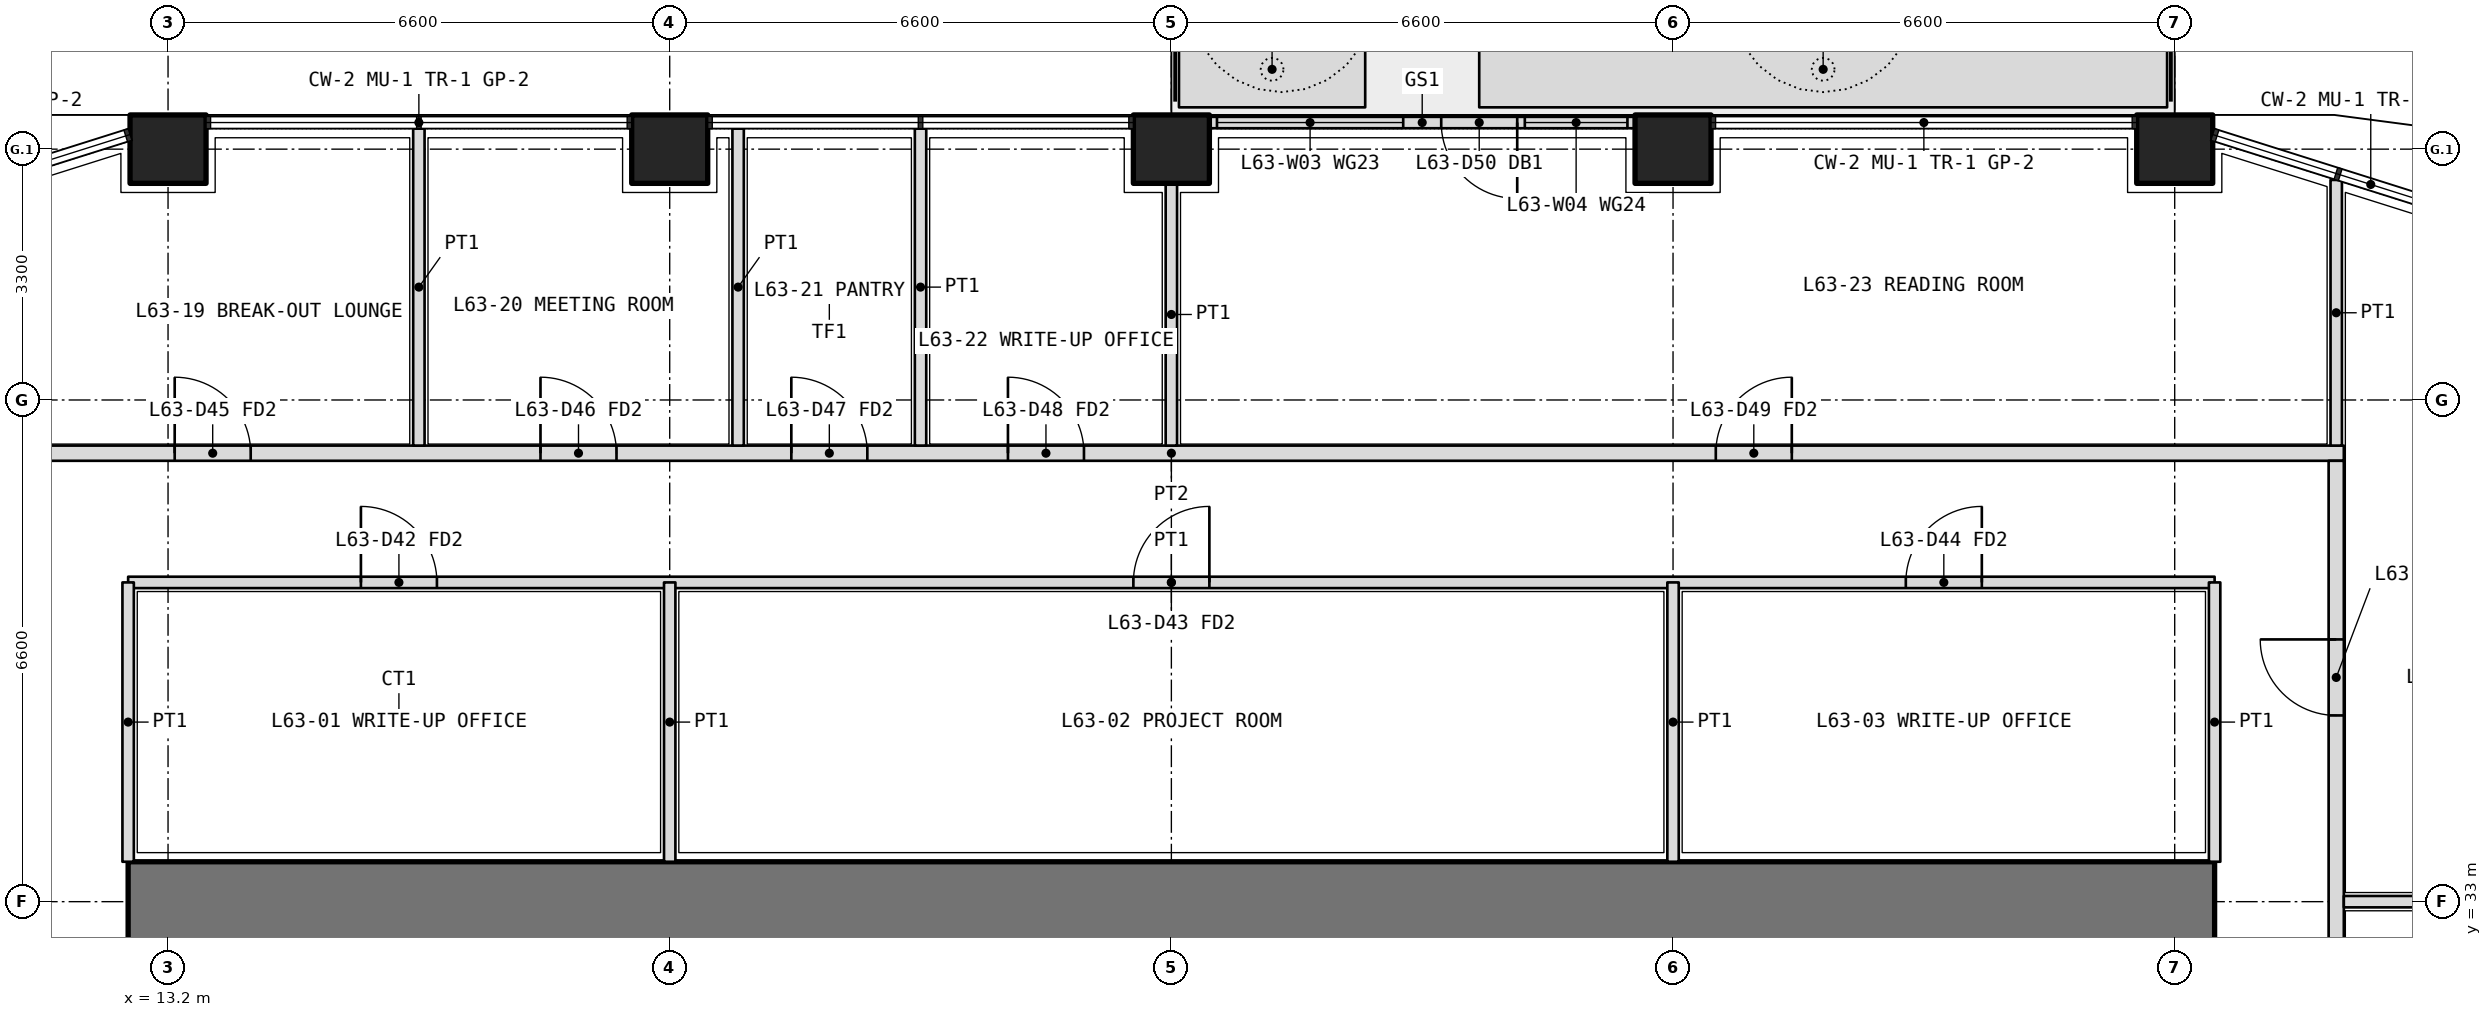
"""IFC4 building model, lengths in metres.
Left out: names, types, materials, properties, quantities, classifications, styles, units other than length and angle.
Written with IfcOpenShell. Run it as: python <this file> out.ifc"""

import sys

from ifc_helpers import new_model, si_unit, direction, frame, frame_2d, origin, origin_2d, place, context, subcontext, project, spatial, polyline, rectangle, outline, extrude, element, fill, save


model = new_model("IFC4")
c1 = context("Model", 3, precision=1e-05, world=origin(), true_north=direction((0.0, 1.0)))
c2 = subcontext(c1, "Body", "Model", "MODEL_VIEW")
j1 = project(units=[si_unit("LENGTHUNIT", "METRE"), si_unit("PLANEANGLEUNIT", "RADIAN")], contexts=[c1])
p1 = place(None, origin())
s1 = spatial("IfcSite", under=j1, at=p1, CompositionType="ELEMENT")
p2 = place(p1, origin())
s2 = spatial("IfcBuilding", under=s1, at=p2, CompositionType="ELEMENT")
p3 = place(p2, frame((0.0, 0.0, 275.4)))
s3 = spatial("IfcBuildingStorey", under=s2, at=p3, CompositionType="ELEMENT", Elevation=275.4)
for number, where, z_axis, x_axis in (
    (1, (13.2, 42.9, 0.0), (0.0, 0.0, 1.0), (1.0, 0.0, 0.0)),
    (2, (19.8, 42.9, 0.0), (0.0, 0.0, 1.0), (1.0, 0.0, 0.0)),
    (3, (26.4, 42.9, 0.0), (0.0, 0.0, 1.0), (1.0, 0.0, 0.0)),
    (4, (33.0, 42.9, 0.0), (0.0, 0.0, 1.0), (1.0, 0.0, 0.0)),
    (5, (39.6, 42.9, 0.0), (0.0, 0.0, 1.0), (1.0, 0.0, 0.0)),
):
    element("IfcColumn", number, at=place(p3, frame(where, z_axis=z_axis, x_axis=x_axis)), inside=s3, PredefinedType="COLUMN", context=c2, shape_type="SweptSolid", body=[
        extrude(rectangle(XDim=1.0, YDim=0.9, at=origin_2d()), origin(), (0.0, 0.0, 1.0), 4.2),
    ])
p4 = place(p3, origin())
e6 = element("IfcWall", 6, at=p4, inside=s3, PredefinedType="USERDEFINED", context=c2, shape_type="SweptSolid", body=[
    extrude(outline(polyline([(26.5, 43.45), (28.95, 43.45), (28.95, 44.45), (26.5, 44.45), (26.5, 43.45)]), holes=[polyline([(26.65, 43.6), (28.8, 43.6), (28.8, 44.3), (26.65, 44.3), (26.65, 43.6)])]), origin(), (0.0, 0.0, 1.0), 1.05),
])
p5 = place(p3, origin())
e7 = element("IfcWall", 7, at=p5, inside=s3, PredefinedType="USERDEFINED", context=c2, shape_type="SweptSolid", body=[
    extrude(outline(polyline([(30.45, 43.45), (39.5, 43.45), (39.5, 44.45), (30.45, 44.45), (30.45, 43.45)]), holes=[polyline([(30.6, 43.6), (39.35, 43.6), (39.35, 44.3), (30.6, 44.3), (30.6, 43.6)])]), origin(), (0.0, 0.0, 1.0), 1.05),
])
p6 = place(p3, frame((32.5, 43.25, 0.0), z_axis=(0.0, 0.0, 1.0), x_axis=(-1.0, 0.0, 0.0)))
e8 = element("IfcWall", 8, at=p6, inside=s3, PredefinedType="SOLIDWALL", context=c2, shape_type="SweptSolid", body=[
    extrude(rectangle(XDim=5.6, YDim=0.15, at=frame_2d((2.8, 0.0))), origin(), (0.0, 0.0, 1.0), 2.7),
])
p7 = place(p6, frame((1.55, 0.0, 0.0)))
e9 = element("IfcOpeningElement", 9, at=p7, cuts=e8, PredefinedType="OPENING", context=c2, shape_type="SweptSolid", body=[
    extrude(rectangle(XDim=1.0, YDim=2.4, at=frame_2d((0.5, 1.2))), frame((0.0, 0.085, 0.0), z_axis=(0.0, -1.0, 0.0), x_axis=(1.0, 0.0, 0.0)), (0.0, 0.0, 1.0), 0.17),
])
p8 = place(p6, frame((0.1, 0.0, 0.1)))
e10 = element("IfcOpeningElement", 10, at=p8, cuts=e8, PredefinedType="OPENING", context=c2, shape_type="SweptSolid", body=[
    extrude(rectangle(XDim=1.35, YDim=2.3, at=frame_2d((0.675, 1.15))), frame((0.0, 0.085, 0.0), z_axis=(0.0, -1.0, 0.0), x_axis=(1.0, 0.0, 0.0)), (0.0, 0.0, 1.0), 0.17),
])
p9 = place(p6, frame((3.05, 0.0, 0.1)))
e11 = element("IfcOpeningElement", 11, at=p9, cuts=e8, PredefinedType="OPENING", context=c2, shape_type="SweptSolid", body=[
    extrude(rectangle(XDim=2.45, YDim=2.3, at=frame_2d((1.225, 1.15))), frame((0.0, 0.085, 0.0), z_axis=(0.0, -1.0, 0.0), x_axis=(1.0, 0.0, 0.0)), (0.0, 0.0, 1.0), 0.17),
])
p10 = place(p3, frame((40.125, 33.0, 0.0), z_axis=(0.0, 0.0, 1.0), x_axis=(-1.0, 0.0, 0.0)))
e12 = element("IfcWall", 12, at=p10, inside=s3, PredefinedType="SHEAR", context=c2, shape_type="SweptSolid", body=[
    extrude(rectangle(XDim=27.45, YDim=1.05, at=frame_2d((13.725, 0.0))), origin(), (0.0, 0.0, 1.0), 4.2),
])
p11 = place(p3, frame((12.675, 37.2, 0.0), z_axis=(0.0, 0.0, 1.0), x_axis=(1.0, 0.0, 0.0)))
e13 = element("IfcWall", 13, at=p11, inside=s3, PredefinedType="PARTITIONING", context=c2, shape_type="SweptSolid", body=[
    extrude(rectangle(XDim=27.45, YDim=0.15, at=frame_2d((13.725, 0.0))), origin(), (0.0, 0.0, 1.0), 3.0),
])
p12 = place(p11, frame((3.062, 0.0, 0.0)))
e14 = element("IfcOpeningElement", 14, at=p12, cuts=e13, PredefinedType="OPENING", context=c2, shape_type="SweptSolid", body=[
    extrude(rectangle(XDim=1.0, YDim=2.1, at=frame_2d((0.5, 1.05))), frame((0.0, 0.085, 0.0), z_axis=(0.0, -1.0, 0.0), x_axis=(1.0, 0.0, 0.0)), (0.0, 0.0, 1.0), 0.17),
])
p13 = place(p11, frame((13.225, 0.0, 0.0)))
e15 = element("IfcOpeningElement", 15, at=p13, cuts=e13, PredefinedType="OPENING", context=c2, shape_type="SweptSolid", body=[
    extrude(rectangle(XDim=1.0, YDim=2.1, at=frame_2d((0.5, 1.05))), frame((0.0, 0.085, 0.0), z_axis=(0.0, -1.0, 0.0), x_axis=(1.0, 0.0, 0.0)), (0.0, 0.0, 1.0), 0.17),
])
p14 = place(p11, frame((23.387, 0.0, 0.0)))
e16 = element("IfcOpeningElement", 16, at=p14, cuts=e13, PredefinedType="OPENING", context=c2, shape_type="SweptSolid", body=[
    extrude(rectangle(XDim=1.0, YDim=2.1, at=frame_2d((0.5, 1.05))), frame((0.0, 0.085, 0.0), z_axis=(0.0, -1.0, 0.0), x_axis=(1.0, 0.0, 0.0)), (0.0, 0.0, 1.0), 0.17),
])
for number, where, z_axis, x_axis in (
    (17, (12.675, 33.525, 0.0), (0.0, 0.0, 1.0), (0.0, 1.0, 0.0)),
    (18, (40.125, 33.525, 0.0), (0.0, 0.0, 1.0), (0.0, 1.0, 0.0)),
    (19, (19.8, 33.525, 0.0), (0.0, 0.0, 1.0), (0.0, 1.0, 0.0)),
    (20, (33.0, 33.525, 0.0), (0.0, 0.0, 1.0), (0.0, 1.0, 0.0)),
):
    element("IfcWall", number, at=place(p3, frame(where, z_axis=z_axis, x_axis=x_axis)), inside=s3, PredefinedType="PARTITIONING", context=c2, shape_type="SweptSolid", body=[
        extrude(rectangle(XDim=3.675, YDim=0.15, at=frame_2d((1.837, 0.0))), origin(), (0.0, 0.0, 1.0), 3.0),
    ])
p15 = place(p3, frame((10.975, 38.9, 0.0), z_axis=(0.0, 0.0, 1.0), x_axis=(1.0, 0.0, 0.0)))
e21 = element("IfcWall", 21, at=p15, inside=s3, PredefinedType="PARTITIONING", context=c2, shape_type="SweptSolid", body=[
    extrude(rectangle(XDim=30.85, YDim=0.2, at=frame_2d((15.425, 0.0))), origin(), (0.0, 0.0, 1.0), 3.0),
])
p16 = place(p15, frame((2.312, 0.0, 0.0)))
e22 = element("IfcOpeningElement", 22, at=p16, cuts=e21, PredefinedType="OPENING", context=c2, shape_type="SweptSolid", body=[
    extrude(rectangle(XDim=1.0, YDim=2.1, at=frame_2d((0.5, 1.05))), frame((0.0, 0.11, 0.0), z_axis=(0.0, -1.0, 0.0), x_axis=(1.0, 0.0, 0.0)), (0.0, 0.0, 1.0), 0.22),
])
p17 = place(p15, frame((7.125, 0.0, 0.0)))
e23 = element("IfcOpeningElement", 23, at=p17, cuts=e21, PredefinedType="OPENING", context=c2, shape_type="SweptSolid", body=[
    extrude(rectangle(XDim=1.0, YDim=2.1, at=frame_2d((0.5, 1.05))), frame((0.0, 0.11, 0.0), z_axis=(0.0, -1.0, 0.0), x_axis=(1.0, 0.0, 0.0)), (0.0, 0.0, 1.0), 0.22),
])
p18 = place(p15, frame((10.425, 0.0, 0.0)))
e24 = element("IfcOpeningElement", 24, at=p18, cuts=e21, PredefinedType="OPENING", context=c2, shape_type="SweptSolid", body=[
    extrude(rectangle(XDim=1.0, YDim=2.1, at=frame_2d((0.5, 1.05))), frame((0.0, 0.11, 0.0), z_axis=(0.0, -1.0, 0.0), x_axis=(1.0, 0.0, 0.0)), (0.0, 0.0, 1.0), 0.22),
])
p19 = place(p15, frame((13.275, 0.0, 0.0)))
e25 = element("IfcOpeningElement", 25, at=p19, cuts=e21, PredefinedType="OPENING", context=c2, shape_type="SweptSolid", body=[
    extrude(rectangle(XDim=1.0, YDim=2.1, at=frame_2d((0.5, 1.05))), frame((0.0, 0.11, 0.0), z_axis=(0.0, -1.0, 0.0), x_axis=(1.0, 0.0, 0.0)), (0.0, 0.0, 1.0), 0.22),
])
p20 = place(p15, frame((22.587, 0.0, 0.0)))
e26 = element("IfcOpeningElement", 26, at=p20, cuts=e21, PredefinedType="OPENING", context=c2, shape_type="SweptSolid", body=[
    extrude(rectangle(XDim=1.0, YDim=2.1, at=frame_2d((0.5, 1.05))), frame((0.0, 0.11, 0.0), z_axis=(0.0, -1.0, 0.0), x_axis=(1.0, 0.0, 0.0)), (0.0, 0.0, 1.0), 0.22),
])
p21 = place(p3, frame((41.725, 7.4, 0.0), z_axis=(0.0, 0.0, 1.0), x_axis=(0.0, 1.0, 0.0)))
e27 = element("IfcWall", 27, at=p21, inside=s3, PredefinedType="PARTITIONING", context=c2, shape_type="SweptSolid", body=[
    extrude(rectangle(XDim=31.4, YDim=0.2, at=frame_2d((15.7, 0.0))), origin(), (0.0, 0.0, 1.0), 3.0),
])
p22 = place(p21, frame((3.9, 0.0, 0.0)))
e28 = element("IfcOpeningElement", 28, at=p22, cuts=e27, PredefinedType="OPENING", context=c2, shape_type="SweptSolid", body=[
    extrude(rectangle(XDim=1.2, YDim=2.1, at=frame_2d((0.6, 1.05))), frame((0.0, 0.11, 0.0), z_axis=(0.0, -1.0, 0.0), x_axis=(1.0, 0.0, 0.0)), (0.0, 0.0, 1.0), 0.22),
])
p23 = place(p21, frame((10.25, 0.0, 0.0)))
e29 = element("IfcOpeningElement", 29, at=p23, cuts=e27, PredefinedType="OPENING", context=c2, shape_type="SweptSolid", body=[
    extrude(rectangle(XDim=1.0, YDim=2.1, at=frame_2d((0.5, 1.05))), frame((0.0, 0.11, 0.0), z_axis=(0.0, -1.0, 0.0), x_axis=(1.0, 0.0, 0.0)), (0.0, 0.0, 1.0), 0.22),
])
p24 = place(p21, frame((13.4, 0.0, 0.0)))
e30 = element("IfcOpeningElement", 30, at=p24, cuts=e27, PredefinedType="OPENING", context=c2, shape_type="SweptSolid", body=[
    extrude(rectangle(XDim=1.0, YDim=2.1, at=frame_2d((0.5, 1.05))), frame((0.0, 0.11, 0.0), z_axis=(0.0, -1.0, 0.0), x_axis=(1.0, 0.0, 0.0)), (0.0, 0.0, 1.0), 0.22),
])
p25 = place(p21, frame((16.75, 0.0, 0.0)))
e31 = element("IfcOpeningElement", 31, at=p25, cuts=e27, PredefinedType="OPENING", context=c2, shape_type="SweptSolid", body=[
    extrude(rectangle(XDim=0.9, YDim=2.1, at=frame_2d((0.45, 1.05))), frame((0.0, 0.11, 0.0), z_axis=(0.0, -1.0, 0.0), x_axis=(1.0, 0.0, 0.0)), (0.0, 0.0, 1.0), 0.22),
])
p26 = place(p21, frame((20.15, 0.0, 0.0)))
e32 = element("IfcOpeningElement", 32, at=p26, cuts=e27, PredefinedType="OPENING", context=c2, shape_type="SweptSolid", body=[
    extrude(rectangle(XDim=1.0, YDim=2.1, at=frame_2d((0.5, 1.05))), frame((0.0, 0.11, 0.0), z_axis=(0.0, -1.0, 0.0), x_axis=(1.0, 0.0, 0.0)), (0.0, 0.0, 1.0), 0.22),
])
p27 = place(p21, frame((23.45, 0.0, 0.0)))
e33 = element("IfcOpeningElement", 33, at=p27, cuts=e27, PredefinedType="OPENING", context=c2, shape_type="SweptSolid", body=[
    extrude(rectangle(XDim=1.0, YDim=2.1, at=frame_2d((0.5, 1.05))), frame((0.0, 0.11, 0.0), z_axis=(0.0, -1.0, 0.0), x_axis=(1.0, 0.0, 0.0)), (0.0, 0.0, 1.0), 0.22),
])
p28 = place(p21, frame((28.05, 0.0, 0.0)))
e34 = element("IfcOpeningElement", 34, at=p28, cuts=e27, PredefinedType="OPENING", context=c2, shape_type="SweptSolid", body=[
    extrude(rectangle(XDim=1.0, YDim=2.1, at=frame_2d((0.5, 1.05))), frame((0.0, 0.11, 0.0), z_axis=(0.0, -1.0, 0.0), x_axis=(1.0, 0.0, 0.0)), (0.0, 0.0, 1.0), 0.22),
])
p29 = place(p3, frame((41.725, 42.495, 0.0), z_axis=(0.0, 0.0, 1.0), x_axis=(0.0, -1.0, 0.0)))
e35 = element("IfcWall", 35, at=p29, inside=s3, PredefinedType="PARTITIONING", context=c2, shape_type="SweptSolid", body=[
    extrude(rectangle(XDim=3.495, YDim=0.15, at=frame_2d((1.748, 0.0))), origin(), (0.0, 0.0, 1.0), 2.7),
])
p30 = place(p3, frame((45.75, 33.0, 0.0), z_axis=(0.0, 0.0, 1.0), x_axis=(-1.0, 0.0, 0.0)))
e36 = element("IfcWall", 36, at=p30, inside=s3, PredefinedType="PARTITIONING", context=c2, shape_type="SweptSolid", body=[
    extrude(rectangle(XDim=3.925, YDim=0.15, at=frame_2d((1.962, 0.0))), origin(), (0.0, 0.0, 1.0), 3.0),
])
for number, where, z_axis, x_axis in (
    (37, (20.7, 43.17, 0.0), (0.0, 0.0, 1.0), (0.0, -1.0, 0.0)),
    (38, (23.1, 43.17, 0.0), (0.0, 0.0, 1.0), (0.0, -1.0, 0.0)),
    (39, (16.5, 43.17, 0.0), (0.0, 0.0, 1.0), (0.0, -1.0, 0.0)),
):
    element("IfcWall", number, at=place(p3, frame(where, z_axis=z_axis, x_axis=x_axis)), inside=s3, PredefinedType="PARTITIONING", context=c2, shape_type="SweptSolid", body=[
        extrude(rectangle(XDim=4.17, YDim=0.15, at=frame_2d((2.085, 0.0))), origin(), (0.0, 0.0, 1.0), 2.7),
    ])
p31 = place(p3, frame((26.4, 42.45, 0.0), z_axis=(0.0, 0.0, 1.0), x_axis=(0.0, -1.0, 0.0)))
e40 = element("IfcWall", 40, at=p31, inside=s3, PredefinedType="PARTITIONING", context=c2, shape_type="SweptSolid", body=[
    extrude(rectangle(XDim=3.45, YDim=0.15, at=frame_2d((1.725, 0.0))), origin(), (0.0, 0.0, 1.0), 3.0),
])
p32 = place(p7, origin())
e41 = element("IfcDoor", 41, at=p32, inside=s3, OperationType="SINGLE_SWING_LEFT", PredefinedType="DOOR", context=c2, shape_type="SweptSolid", body=[
    extrude(rectangle(XDim=1.0, YDim=2.4, at=frame_2d((0.5, 1.2))), frame((0.0, 0.025, 0.0), z_axis=(0.0, -1.0, 0.0), x_axis=(1.0, 0.0, 0.0)), (0.0, 0.0, 1.0), 0.05),
])
fill(e9, e41)
p33 = place(p8, origin())
e42 = element("IfcWindow", 42, at=p33, inside=s3, PartitioningType="SINGLE_PANEL", PredefinedType="WINDOW", context=c2, shape_type="SweptSolid", body=[
    extrude(rectangle(XDim=1.35, YDim=2.3, at=frame_2d((0.675, 1.15))), frame((0.0, 0.03, 0.0), z_axis=(0.0, -1.0, 0.0), x_axis=(1.0, 0.0, 0.0)), (0.0, 0.0, 1.0), 0.06),
])
fill(e10, e42)
p34 = place(p9, origin())
e43 = element("IfcWindow", 43, at=p34, inside=s3, PartitioningType="SINGLE_PANEL", PredefinedType="WINDOW", context=c2, shape_type="SweptSolid", body=[
    extrude(rectangle(XDim=2.45, YDim=2.3, at=frame_2d((1.225, 1.15))), frame((0.0, 0.03, 0.0), z_axis=(0.0, -1.0, 0.0), x_axis=(1.0, 0.0, 0.0)), (0.0, 0.0, 1.0), 0.06),
])
fill(e11, e43)
p35 = place(p12, origin())
e44 = element("IfcDoor", 44, at=p35, inside=s3, OperationType="SINGLE_SWING_LEFT", PredefinedType="DOOR", context=c2, shape_type="SweptSolid", body=[
    extrude(rectangle(XDim=1.0, YDim=2.1, at=frame_2d((0.5, 1.05))), frame((0.0, 0.025, 0.0), z_axis=(0.0, -1.0, 0.0), x_axis=(1.0, 0.0, 0.0)), (0.0, 0.0, 1.0), 0.05),
])
fill(e14, e44)
p36 = place(p13, origin())
e45 = element("IfcDoor", 45, at=p36, inside=s3, OperationType="SINGLE_SWING_RIGHT", PredefinedType="DOOR", context=c2, shape_type="SweptSolid", body=[
    extrude(rectangle(XDim=1.0, YDim=2.1, at=frame_2d((0.5, 1.05))), frame((0.0, 0.025, 0.0), z_axis=(0.0, -1.0, 0.0), x_axis=(1.0, 0.0, 0.0)), (0.0, 0.0, 1.0), 0.05),
])
fill(e15, e45)
p37 = place(p14, origin())
e46 = element("IfcDoor", 46, at=p37, inside=s3, OperationType="SINGLE_SWING_RIGHT", PredefinedType="DOOR", context=c2, shape_type="SweptSolid", body=[
    extrude(rectangle(XDim=1.0, YDim=2.1, at=frame_2d((0.5, 1.05))), frame((0.0, 0.025, 0.0), z_axis=(0.0, -1.0, 0.0), x_axis=(1.0, 0.0, 0.0)), (0.0, 0.0, 1.0), 0.05),
])
fill(e16, e46)
p38 = place(p28, origin())
e47 = element("IfcDoor", 47, at=p38, inside=s3, OperationType="SINGLE_SWING_RIGHT", PredefinedType="DOOR", context=c2, shape_type="SweptSolid", body=[
    extrude(rectangle(XDim=1.0, YDim=2.1, at=frame_2d((0.5, 1.05))), frame((0.0, 0.025, 0.0), z_axis=(0.0, -1.0, 0.0), x_axis=(1.0, 0.0, 0.0)), (0.0, 0.0, 1.0), 0.05),
])
fill(e34, e47)
p39 = place(p16, origin())
e48 = element("IfcDoor", 48, at=p39, inside=s3, OperationType="SINGLE_SWING_LEFT", PredefinedType="DOOR", context=c2, shape_type="SweptSolid", body=[
    extrude(rectangle(XDim=1.0, YDim=2.1, at=frame_2d((0.5, 1.05))), frame((0.0, 0.025, 0.0), z_axis=(0.0, -1.0, 0.0), x_axis=(1.0, 0.0, 0.0)), (0.0, 0.0, 1.0), 0.05),
])
fill(e22, e48)
p40 = place(p17, origin())
e49 = element("IfcDoor", 49, at=p40, inside=s3, OperationType="SINGLE_SWING_LEFT", PredefinedType="DOOR", context=c2, shape_type="SweptSolid", body=[
    extrude(rectangle(XDim=1.0, YDim=2.1, at=frame_2d((0.5, 1.05))), frame((0.0, 0.025, 0.0), z_axis=(0.0, -1.0, 0.0), x_axis=(1.0, 0.0, 0.0)), (0.0, 0.0, 1.0), 0.05),
])
fill(e23, e49)
p41 = place(p18, origin())
e50 = element("IfcDoor", 50, at=p41, inside=s3, OperationType="SINGLE_SWING_LEFT", PredefinedType="DOOR", context=c2, shape_type="SweptSolid", body=[
    extrude(rectangle(XDim=1.0, YDim=2.1, at=frame_2d((0.5, 1.05))), frame((0.0, 0.025, 0.0), z_axis=(0.0, -1.0, 0.0), x_axis=(1.0, 0.0, 0.0)), (0.0, 0.0, 1.0), 0.05),
])
fill(e24, e50)
p42 = place(p19, origin())
e51 = element("IfcDoor", 51, at=p42, inside=s3, OperationType="SINGLE_SWING_LEFT", PredefinedType="DOOR", context=c2, shape_type="SweptSolid", body=[
    extrude(rectangle(XDim=1.0, YDim=2.1, at=frame_2d((0.5, 1.05))), frame((0.0, 0.025, 0.0), z_axis=(0.0, -1.0, 0.0), x_axis=(1.0, 0.0, 0.0)), (0.0, 0.0, 1.0), 0.05),
])
fill(e25, e51)
p43 = place(p20, origin())
e52 = element("IfcDoor", 52, at=p43, inside=s3, OperationType="SINGLE_SWING_RIGHT", PredefinedType="DOOR", context=c2, shape_type="SweptSolid", body=[
    extrude(rectangle(XDim=1.0, YDim=2.1, at=frame_2d((0.5, 1.05))), frame((0.0, 0.025, 0.0), z_axis=(0.0, -1.0, 0.0), x_axis=(1.0, 0.0, 0.0)), (0.0, 0.0, 1.0), 0.05),
])
fill(e26, e52)
save(model, sys.argv[1])
